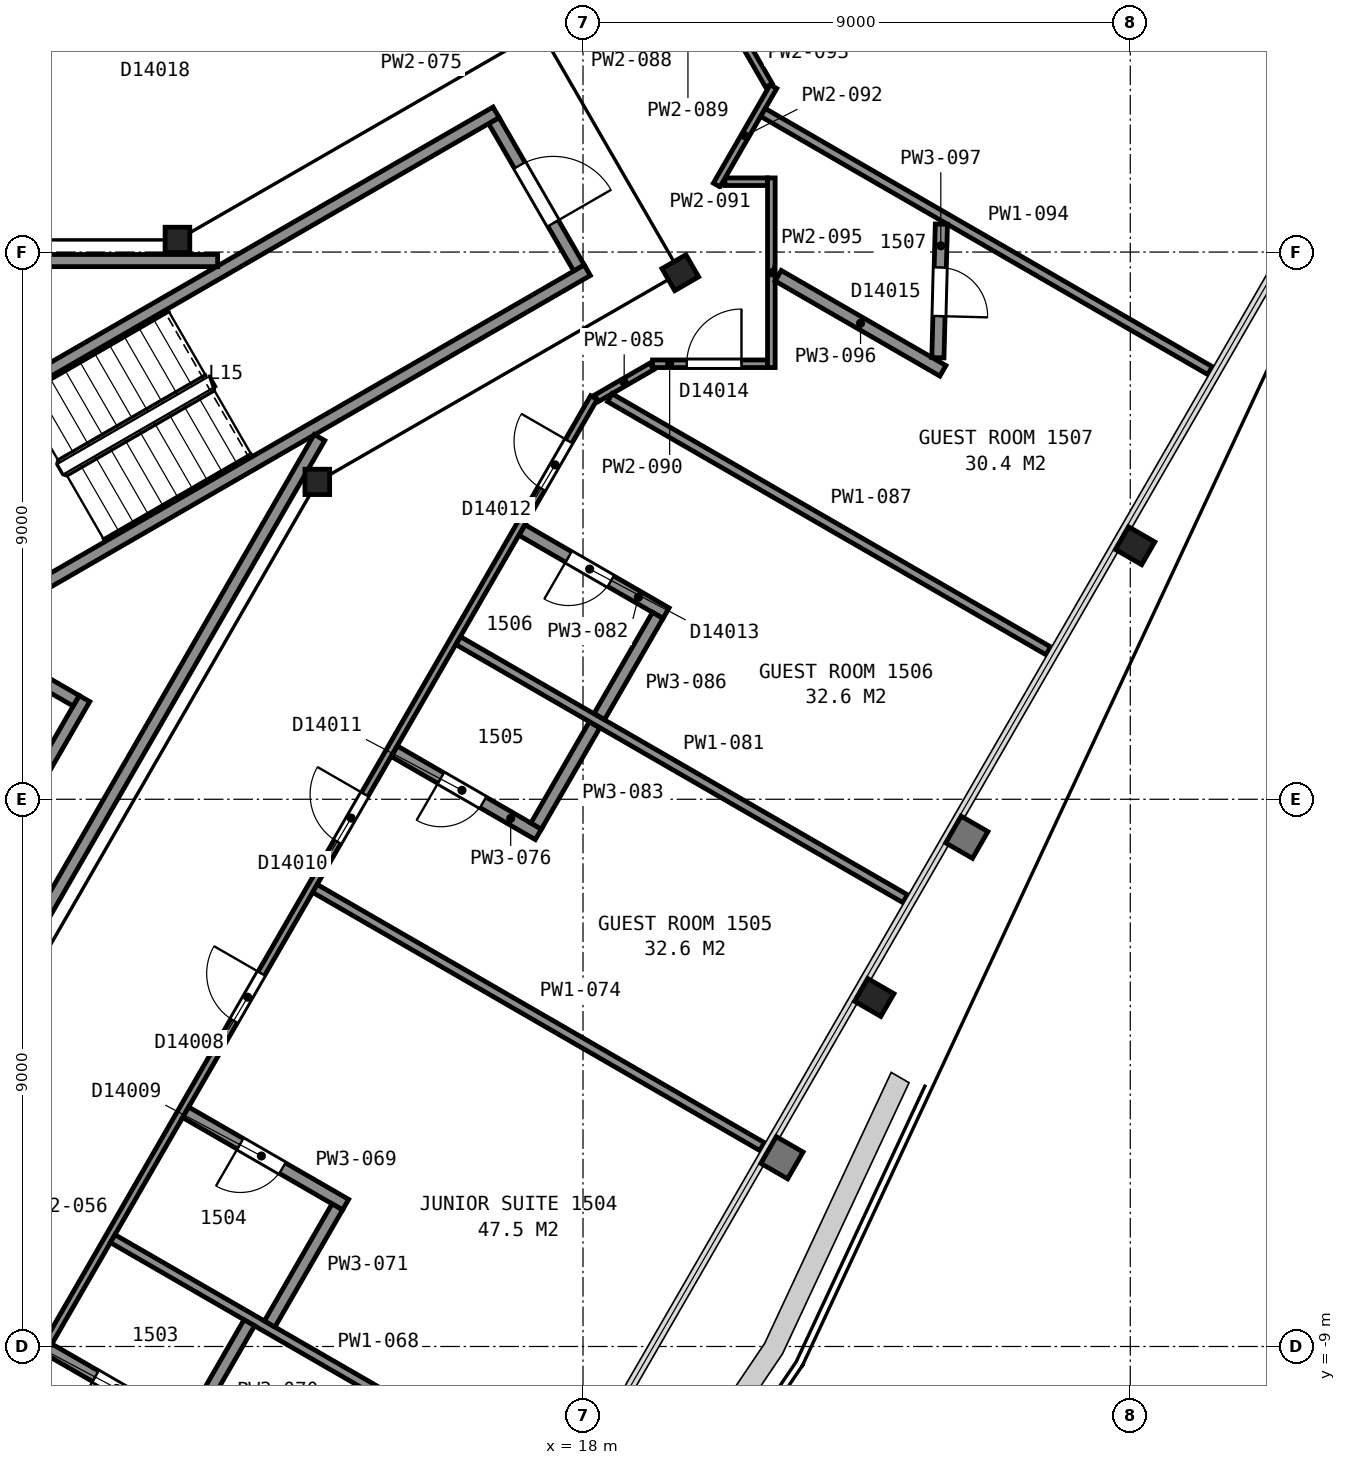
"""IFC4 building model, lengths in metres.
Left out: names, types, materials, properties, quantities, classifications, styles, units other than length and angle.
Written with IfcOpenShell. Run it as: python <this file> out.ifc"""

import sys

from ifc_helpers import new_model, si_unit, direction, frame, frame_2d, origin, origin_2d, place, context, subcontext, project, spatial, rectangle, i_section, extrude, element, fill, save


model = new_model("IFC4")
c1 = context("Model", 3, precision=1e-05, world=origin(), true_north=direction((0.0, 1.0)))
c2 = subcontext(c1, "Body", "Model", "MODEL_VIEW")
j1 = project(units=[si_unit("LENGTHUNIT", "METRE"), si_unit("PLANEANGLEUNIT", "RADIAN")], contexts=[c1])
p1 = place(None, origin())
s1 = spatial("IfcSite", under=j1, at=p1, CompositionType="ELEMENT")
p2 = place(p1, origin())
s2 = spatial("IfcBuilding", under=s1, at=p2, CompositionType="ELEMENT")
p3 = place(p2, frame((0.0, 0.0, 69.2)))
s3 = spatial("IfcBuildingStorey", under=s2, at=p3, CompositionType="ELEMENT", Elevation=69.2)
for number, where, z_axis, x_axis in (
    (1, (22.79, -3.26, 0.0), (0.0, 0.0, 1.0), (-0.5, -0.866, 0.0)),
    (2, (27.08, 4.17, 0.0), (0.0, 0.0, 1.0), (-0.5, -0.866, 0.0)),
):
    element("IfcColumn", number, at=place(p3, frame(where, z_axis=z_axis, x_axis=x_axis)), inside=s3, PredefinedType="COLUMN", context=c2, shape_type="SweptSolid", body=[
        extrude(i_section(OverallWidth=0.432, OverallDepth=0.498, WebThickness=0.056, FlangeThickness=0.089, FilletRadius=0.015, at=origin_2d()), origin(), (0.0, 0.0, 1.0), 3.575),
    ])
p4 = place(p3, frame((13.63, 5.22, 0.0), z_axis=(0.0, 0.0, 1.0), x_axis=(1.0, 0.0, 0.0)))
e3 = element("IfcColumn", 3, at=p4, inside=s3, PredefinedType="COLUMN", context=c2, shape_type="SweptSolid", body=[
    extrude(i_section(OverallWidth=0.406, OverallDepth=0.417, WebThickness=0.03, FlangeThickness=0.048, FilletRadius=0.015, at=origin_2d()), origin(), (0.0, 0.0, 1.0), 3.6),
])
p5 = place(p3, frame((19.6, 8.66, 0.0), z_axis=(0.0, 0.0, 1.0), x_axis=(0.5, -0.866025403784, 0.0)))
e4 = element("IfcColumn", 4, at=p5, inside=s3, PredefinedType="COLUMN", context=c2, shape_type="SweptSolid", body=[
    extrude(i_section(OverallWidth=0.419, OverallDepth=0.455, WebThickness=0.042, FlangeThickness=0.068, FilletRadius=0.015, at=origin_2d()), origin(), (0.0, 0.0, 1.0), 3.6),
])
p6 = place(p3, frame((11.33, 9.2, 0.0), z_axis=(0.0, 0.0, 1.0), x_axis=(1.0, 0.0, 0.0)))
e5 = element("IfcColumn", 5, at=p6, inside=s3, PredefinedType="COLUMN", context=c2, shape_type="SweptSolid", body=[
    extrude(i_section(OverallWidth=0.406, OverallDepth=0.417, WebThickness=0.03, FlangeThickness=0.048, FilletRadius=0.015, at=origin_2d()), origin(), (0.0, 0.0, 1.0), 3.6),
])
p7 = place(p3, frame((17.934, 8.738, 0.0), z_axis=(0.0, 0.0, 1.0), x_axis=(-0.49998411664, 0.866034573852, 0.0)))
e6 = element("IfcWall", 6, at=p7, inside=s3, PredefinedType="PARTITIONING", context=c2, shape_type="SweptSolid", body=[
    extrude(rectangle(XDim=2.8, YDim=0.2, at=frame_2d((1.4, 0.0))), origin(), (0.0, 0.0, 1.0), 3.35),
])
p8 = place(p7, frame((0.85, 0.0, 0.0)))
e7 = element("IfcOpeningElement", 7, at=p8, cuts=e6, PredefinedType="OPENING", context=c2, shape_type="SweptSolid", body=[
    extrude(rectangle(XDim=1.1, YDim=2.1, at=frame_2d((0.55, 1.05))), frame((0.0, 0.11, 0.0), z_axis=(0.0, -1.0, 0.0), x_axis=(1.0, 0.0, 0.0)), (0.0, 0.0, 1.0), 0.22),
])
for number, where, z_axis, x_axis in (
    (8, (6.178, 5.299, 0.0), (0.0, 0.0, 1.0), (0.866, 0.5, 0.0)),
    (9, (7.678, 2.701, 0.0), (0.0, 0.0, 1.0), (0.866, 0.5, 0.0)),
):
    element("IfcWall", number, at=place(p3, frame(where, z_axis=z_axis, x_axis=x_axis)), inside=s3, PredefinedType="PARTITIONING", context=c2, shape_type="SweptSolid", body=[
        extrude(rectangle(XDim=12.0, YDim=0.2, at=frame_2d((6.0, 0.0))), origin(), (0.0, 0.0, 1.0), 3.35),
    ])
p9 = place(p3, frame((7.451, -2.414, 0.0), z_axis=(0.0, 0.0, 1.0), x_axis=(0.500016218704, 0.866016039709, 0.0)))
e10 = element("IfcWall", 10, at=p9, inside=s3, PredefinedType="PARTITIONING", context=c2, shape_type="SweptSolid", body=[
    extrude(rectangle(XDim=4.7, YDim=0.2, at=frame_2d((2.35, 0.0))), origin(), (0.0, 0.0, 1.0), 3.6),
])
p10 = place(p3, frame((9.665, 1.62, 0.0), z_axis=(0.0, 0.0, 1.0), x_axis=(-0.866002029911, 0.500040482552, 0.0)))
e11 = element("IfcWall", 11, at=p10, inside=s3, PredefinedType="PARTITIONING", context=c2, shape_type="SweptSolid", body=[
    extrude(rectangle(XDim=1.75, YDim=0.2, at=frame_2d((0.875, 0.0))), origin(), (0.0, 0.0, 1.0), 3.6),
])
p11 = place(p3, frame((6.177, 8.86, 0.0), z_axis=(0.0, 0.0, 1.0), x_axis=(1.0, 0.0, 0.0)))
e12 = element("IfcWall", 12, at=p11, inside=s3, PredefinedType="PARTITIONING", context=c2, shape_type="SweptSolid", body=[
    extrude(rectangle(XDim=5.814, YDim=0.2, at=frame_2d((2.907, 0.0))), origin(), (0.0, 0.0, 1.0), 3.35),
])
p12 = place(p3, frame((8.492, -3.012, 0.0), z_axis=(0.0, 0.0, 1.0), x_axis=(0.499972957231, 0.866041016371, 0.0)))
e13 = element("IfcWall", 13, at=p12, inside=s3, PredefinedType="PARTITIONING", context=c2, shape_type="SweptSolid", body=[
    extrude(rectangle(XDim=10.349, YDim=0.2, at=frame_2d((5.174, 0.0))), origin(), (0.0, 0.0, 1.0), 3.35),
])
p13 = place(p3, frame((18.179, 6.606, 0.0), z_axis=(0.0, 0.0, 1.0), x_axis=(-0.500003973642, -0.866023109589, 0.0)))
e14 = element("IfcWall", 14, at=p13, inside=s3, PredefinedType="PARTITIONING", context=c2, shape_type="SweptSolid", body=[
    extrude(rectangle(XDim=28.826, YDim=0.125, at=frame_2d((14.413, 0.0))), origin(), (0.0, 0.0, 1.0), 2.613),
])
p14 = place(p13, frame((21.501, 0.0, 0.0)))
e15 = element("IfcOpeningElement", 15, at=p14, cuts=e14, PredefinedType="OPENING", context=c2, shape_type="SweptSolid", body=[
    extrude(rectangle(XDim=0.9, YDim=2.1, at=frame_2d((0.45, 1.05))), frame((0.0, 0.073, 0.0), z_axis=(0.0, -1.0, 0.0), x_axis=(1.0, 0.0, 0.0)), (0.0, 0.0, 1.0), 0.145),
])
p15 = place(p13, frame((18.894, 0.0, 0.0)))
e16 = element("IfcOpeningElement", 16, at=p15, cuts=e14, PredefinedType="OPENING", context=c2, shape_type="SweptSolid", body=[
    extrude(rectangle(XDim=0.9, YDim=2.1, at=frame_2d((0.45, 1.05))), frame((0.0, 0.073, 0.0), z_axis=(0.0, -1.0, 0.0), x_axis=(1.0, 0.0, 0.0)), (0.0, 0.0, 1.0), 0.145),
])
p16 = place(p13, frame((10.937, 0.0, 0.0)))
e17 = element("IfcOpeningElement", 17, at=p16, cuts=e14, PredefinedType="OPENING", context=c2, shape_type="SweptSolid", body=[
    extrude(rectangle(XDim=0.9, YDim=2.1, at=frame_2d((0.45, 1.05))), frame((0.0, 0.073, 0.0), z_axis=(0.0, -1.0, 0.0), x_axis=(1.0, 0.0, 0.0)), (0.0, 0.0, 1.0), 0.145),
])
p17 = place(p13, frame((7.535, 0.0, 0.0)))
e18 = element("IfcOpeningElement", 18, at=p17, cuts=e14, PredefinedType="OPENING", context=c2, shape_type="SweptSolid", body=[
    extrude(rectangle(XDim=0.9, YDim=2.1, at=frame_2d((0.45, 1.05))), frame((0.0, 0.073, 0.0), z_axis=(0.0, -1.0, 0.0), x_axis=(1.0, 0.0, 0.0)), (0.0, 0.0, 1.0), 0.145),
])
p18 = place(p13, frame((0.827, 0.0, 0.0)))
e19 = element("IfcOpeningElement", 19, at=p18, cuts=e14, PredefinedType="OPENING", context=c2, shape_type="SweptSolid", body=[
    extrude(rectangle(XDim=0.9, YDim=2.1, at=frame_2d((0.45, 1.05))), frame((0.0, 0.073, 0.0), z_axis=(0.0, -1.0, 0.0), x_axis=(1.0, 0.0, 0.0)), (0.0, 0.0, 1.0), 0.145),
])
p19 = place(p3, frame((9.215, -9.045, 0.0), z_axis=(0.0, 0.0, 1.0), x_axis=(0.865989529477, -0.500062130976, 0.0)))
e20 = element("IfcWall", 20, at=p19, inside=s3, PredefinedType="PARTITIONING", context=c2, shape_type="SweptSolid", body=[
    extrude(rectangle(XDim=2.738, YDim=0.2, at=frame_2d((1.369, 0.0))), origin(), (0.0, 0.0, 1.0), 2.613),
])
p20 = place(p19, frame((0.887, 0.0, 0.0)))
e21 = element("IfcOpeningElement", 21, at=p20, cuts=e20, PredefinedType="OPENING", context=c2, shape_type="SweptSolid", body=[
    extrude(rectangle(XDim=0.8, YDim=2.1, at=frame_2d((0.4, 1.05))), frame((0.0, 0.11, 0.0), z_axis=(0.0, -1.0, 0.0), x_axis=(1.0, 0.0, 0.0)), (0.0, 0.0, 1.0), 0.22),
])
p21 = place(p3, frame((10.265, -7.226, 0.0), z_axis=(0.0, 0.0, 1.0), x_axis=(0.866024716685, -0.500001190089, 0.0)))
e22 = element("IfcWall", 22, at=p21, inside=s3, PredefinedType="PARTITIONING", context=c2, shape_type="SweptSolid", body=[
    extrude(rectangle(XDim=8.492, YDim=0.15, at=frame_2d((4.246, 0.0))), origin(), (0.0, 0.0, 1.0), 2.613),
])
p22 = place(p3, frame((14.096, -6.667, 0.0), z_axis=(0.0, 0.0, 1.0), x_axis=(-0.866023634079, 0.500003065207, 0.0)))
e23 = element("IfcWall", 23, at=p22, inside=s3, PredefinedType="PARTITIONING", context=c2, shape_type="SweptSolid", body=[
    extrude(rectangle(XDim=3.038, YDim=0.2, at=frame_2d((1.519, 0.0))), origin(), (0.0, 0.0, 1.0), 2.613),
])
p23 = place(p22, frame((1.2, 0.0, 0.0)))
e24 = element("IfcOpeningElement", 24, at=p23, cuts=e23, PredefinedType="OPENING", context=c2, shape_type="SweptSolid", body=[
    extrude(rectangle(XDim=0.8, YDim=2.1, at=frame_2d((0.4, 1.05))), frame((0.0, 0.11, 0.0), z_axis=(0.0, -1.0, 0.0), x_axis=(1.0, 0.0, 0.0)), (0.0, 0.0, 1.0), 0.22),
])
p24 = place(p3, frame((11.549, -10.277, 0.0), z_axis=(0.0, 0.0, 1.0), x_axis=(0.499876134923, 0.86609690551, 0.0)))
e25 = element("IfcWall", 25, at=p24, inside=s3, PredefinedType="PARTITIONING", context=c2, shape_type="SweptSolid", body=[
    extrude(rectangle(XDim=1.925, YDim=0.2, at=frame_2d((0.963, 0.0))), origin(), (0.0, 0.0, 1.0), 2.613),
])
p25 = place(p3, frame((12.846, -8.63, 0.0), z_axis=(0.0, 0.0, 1.0), x_axis=(0.500092923031, 0.865971748, 0.0)))
e26 = element("IfcWall", 26, at=p25, inside=s3, PredefinedType="PARTITIONING", context=c2, shape_type="SweptSolid", body=[
    extrude(rectangle(XDim=2.225, YDim=0.2, at=frame_2d((1.112, 0.0))), origin(), (0.0, 0.0, 1.0), 2.613),
])
p26 = place(p3, frame((13.591, -1.466, 0.0), z_axis=(0.0, 0.0, 1.0), x_axis=(0.866022790583, -0.50000452617, 0.0)))
e27 = element("IfcWall", 27, at=p26, inside=s3, PredefinedType="PARTITIONING", context=c2, shape_type="SweptSolid", body=[
    extrude(rectangle(XDim=8.491, YDim=0.15, at=frame_2d((4.246, 0.0))), origin(), (0.0, 0.0, 1.0), 2.613),
])
p27 = place(p3, frame((14.898, 0.789, 0.0), z_axis=(0.0, 0.0, 1.0), x_axis=(0.866102295869, -0.499866795347, 0.0)))
e28 = element("IfcWall", 28, at=p27, inside=s3, PredefinedType="PARTITIONING", context=c2, shape_type="SweptSolid", body=[
    extrude(rectangle(XDim=2.733, YDim=0.2, at=frame_2d((1.367, 0.0))), origin(), (0.0, 0.0, 1.0), 2.613),
])
p28 = place(p27, frame((0.883, 0.0, 0.0)))
e29 = element("IfcOpeningElement", 29, at=p28, cuts=e28, PredefinedType="OPENING", context=c2, shape_type="SweptSolid", body=[
    extrude(rectangle(XDim=0.8, YDim=2.1, at=frame_2d((0.4, 1.05))), frame((0.0, 0.11, 0.0), z_axis=(0.0, -1.0, 0.0), x_axis=(1.0, 0.0, 0.0)), (0.0, 0.0, 1.0), 0.22),
])
p29 = place(p3, frame((15.948, 2.608, 0.0), z_axis=(0.0, 0.0, 1.0), x_axis=(0.866059124033, -0.499941590267, 0.0)))
e30 = element("IfcWall", 30, at=p29, inside=s3, PredefinedType="PARTITIONING", context=c2, shape_type="SweptSolid", body=[
    extrude(rectangle(XDim=8.487, YDim=0.15, at=frame_2d((4.243, 0.0))), origin(), (0.0, 0.0, 1.0), 2.613),
])
p30 = place(p3, frame((19.366, 3.061, 0.0), z_axis=(0.0, 0.0, 1.0), x_axis=(-0.866102295869, 0.499866795347, 0.0)))
e31 = element("IfcWall", 31, at=p30, inside=s3, PredefinedType="PARTITIONING", context=c2, shape_type="SweptSolid", body=[
    extrude(rectangle(XDim=2.733, YDim=0.2, at=frame_2d((1.367, 0.0))), origin(), (0.0, 0.0, 1.0), 2.613),
])
p31 = place(p30, frame((1.051, 0.0, 0.0)))
e32 = element("IfcOpeningElement", 32, at=p31, cuts=e31, PredefinedType="OPENING", context=c2, shape_type="SweptSolid", body=[
    extrude(rectangle(XDim=0.8, YDim=2.1, at=frame_2d((0.4, 1.05))), frame((0.0, 0.11, 0.0), z_axis=(0.0, -1.0, 0.0), x_axis=(1.0, 0.0, 0.0)), (0.0, 0.0, 1.0), 0.22),
])
p32 = place(p3, frame((17.229, -0.44, 0.0), z_axis=(0.0, 0.0, 1.0), x_axis=(0.499667418833, 0.866217334482, 0.0)))
e33 = element("IfcWall", 33, at=p32, inside=s3, PredefinedType="PARTITIONING", context=c2, shape_type="SweptSolid", body=[
    extrude(rectangle(XDim=1.92, YDim=0.2, at=frame_2d((0.96, 0.0))), origin(), (0.0, 0.0, 1.0), 2.613),
])
p33 = place(p3, frame((18.222, 6.594, 0.0), z_axis=(0.0, 0.0, 1.0), x_axis=(0.865876245925, 0.500258260045, 0.0)))
e34 = element("IfcWall", 34, at=p33, inside=s3, PredefinedType="PARTITIONING", context=c2, shape_type="SweptSolid", body=[
    extrude(rectangle(XDim=1.052, YDim=0.125, at=frame_2d((0.526, 0.0))), origin(), (0.0, 0.0, 1.0), 2.613),
])
p34 = place(p3, frame((18.269, 1.361, 0.0), z_axis=(0.0, 0.0, 1.0), x_axis=(0.499993829411, 0.866028966346, 0.0)))
e35 = element("IfcWall", 35, at=p34, inside=s3, PredefinedType="PARTITIONING", context=c2, shape_type="SweptSolid", body=[
    extrude(rectangle(XDim=1.921, YDim=0.2, at=frame_2d((0.96, 0.0))), origin(), (0.0, 0.0, 1.0), 2.613),
])
p35 = place(p3, frame((18.44, 6.605, 0.0), z_axis=(0.0, 0.0, 1.0), x_axis=(0.866044499518, -0.49996692376, 0.0)))
e36 = element("IfcWall", 36, at=p35, inside=s3, PredefinedType="PARTITIONING", context=c2, shape_type="SweptSolid", body=[
    extrude(rectangle(XDim=8.328, YDim=0.15, at=frame_2d((4.164, 0.0))), origin(), (0.0, 0.0, 1.0), 2.613),
])
p36 = place(p3, frame((21.032, 7.163, 0.0), z_axis=(0.0, 0.0, 1.0), x_axis=(-1.0, 0.0, 0.0)))
e37 = element("IfcWall", 37, at=p36, inside=s3, PredefinedType="PARTITIONING", context=c2, shape_type="SweptSolid", body=[
    extrude(rectangle(XDim=1.888, YDim=0.125, at=frame_2d((0.944, 0.0))), origin(), (0.0, 0.0, 1.0), 2.613),
])
p37 = place(p36, frame((0.426, 0.0, 0.0)))
e38 = element("IfcOpeningElement", 38, at=p37, cuts=e37, PredefinedType="OPENING", context=c2, shape_type="SweptSolid", body=[
    extrude(rectangle(XDim=0.9, YDim=2.1, at=frame_2d((0.45, 1.05))), frame((0.0, 0.073, 0.0), z_axis=(0.0, -1.0, 0.0), x_axis=(1.0, 0.0, 0.0)), (0.0, 0.0, 1.0), 0.145),
])
p38 = place(p3, frame((20.334, 10.157, 0.0), z_axis=(0.0, 0.0, 1.0), x_axis=(1.0, 0.0, 0.0)))
e39 = element("IfcWall", 39, at=p38, inside=s3, PredefinedType="PARTITIONING", context=c2, shape_type="SweptSolid", body=[
    extrude(rectangle(XDim=0.698, YDim=0.125, at=frame_2d((0.349, 0.0))), origin(), (0.0, 0.0, 1.0), 2.613),
])
p39 = place(p3, frame((20.198, 10.103, 0.0), z_axis=(0.0, 0.0, 1.0), x_axis=(0.500072997275, 0.865983254686, 0.0)))
e40 = element("IfcWall", 40, at=p39, inside=s3, PredefinedType="PARTITIONING", context=c2, shape_type="SweptSolid", body=[
    extrude(rectangle(XDim=1.869, YDim=0.125, at=frame_2d((0.935, 0.0))), origin(), (0.0, 0.0, 1.0), 2.613),
])
p40 = place(p3, frame((20.697, 12.367, 0.0), z_axis=(0.0, 0.0, 1.0), x_axis=(0.500238258503, -0.865887801468, 0.0)))
e41 = element("IfcWall", 41, at=p40, inside=s3, PredefinedType="PARTITIONING", context=c2, shape_type="SweptSolid", body=[
    extrude(rectangle(XDim=0.724, YDim=0.125, at=frame_2d((0.362, 0.0))), origin(), (0.0, 0.0, 1.0), 2.613),
])
p41 = place(p3, frame((20.959, 11.296, 0.0), z_axis=(0.0, 0.0, 1.0), x_axis=(0.866022790583, -0.50000452617, 0.0)))
e42 = element("IfcWall", 42, at=p41, inside=s3, PredefinedType="PARTITIONING", context=c2, shape_type="SweptSolid", body=[
    extrude(rectangle(XDim=8.491, YDim=0.15, at=frame_2d((4.246, 0.0))), origin(), (0.0, 0.0, 1.0), 2.613),
])
p42 = place(p3, frame((21.097, 7.101, 0.0), z_axis=(0.0, 0.0, 1.0), x_axis=(0.0, 1.0, 0.0)))
e43 = element("IfcWall", 43, at=p42, inside=s3, PredefinedType="PARTITIONING", context=c2, shape_type="SweptSolid", body=[
    extrude(rectangle(XDim=3.119, YDim=0.125, at=frame_2d((1.56, 0.0))), origin(), (0.0, 0.0, 1.0), 2.613),
])
p43 = place(p3, frame((21.209, 8.611, 0.0), z_axis=(0.0, 0.0, 1.0), x_axis=(0.866054327916, -0.499949898588, 0.0)))
e44 = element("IfcWall", 44, at=p43, inside=s3, PredefinedType="PARTITIONING", context=c2, shape_type="SweptSolid", body=[
    extrude(rectangle(XDim=3.128, YDim=0.2, at=frame_2d((1.564, 0.0))), origin(), (0.0, 0.0, 1.0), 2.613),
])
p44 = place(p3, frame((23.836, 7.262, 0.0), z_axis=(0.0, 0.0, 1.0), x_axis=(0.025988330811, 0.999662246292, 0.0)))
e45 = element("IfcWall", 45, at=p44, inside=s3, PredefinedType="PARTITIONING", context=c2, shape_type="SweptSolid", body=[
    extrude(rectangle(XDim=2.198, YDim=0.2, at=frame_2d((1.099, 0.0))), origin(), (0.0, 0.0, 1.0), 2.613),
])
p45 = place(p44, frame((0.685, 0.0, 0.0)))
e46 = element("IfcOpeningElement", 46, at=p45, cuts=e45, PredefinedType="OPENING", context=c2, shape_type="SweptSolid", body=[
    extrude(rectangle(XDim=0.8, YDim=2.1, at=frame_2d((0.4, 1.05))), frame((0.0, 0.11, 0.0), z_axis=(0.0, -1.0, 0.0), x_axis=(1.0, 0.0, 0.0)), (0.0, 0.0, 1.0), 0.22),
])
p46 = place(p8, origin())
e47 = element("IfcDoor", 47, at=p46, inside=s3, OperationType="SINGLE_SWING_LEFT", PredefinedType="DOOR", context=c2, shape_type="SweptSolid", body=[
    extrude(rectangle(XDim=1.1, YDim=2.1, at=frame_2d((0.55, 1.05))), frame((0.0, 0.025, 0.0), z_axis=(0.0, -1.0, 0.0), x_axis=(1.0, 0.0, 0.0)), (0.0, 0.0, 1.0), 0.05),
])
fill(e7, e47)
p47 = place(p16, origin())
e48 = element("IfcDoor", 48, at=p47, inside=s3, OperationType="SINGLE_SWING_LEFT", PredefinedType="DOOR", context=c2, shape_type="SweptSolid", body=[
    extrude(rectangle(XDim=0.9, YDim=2.1, at=frame_2d((0.45, 1.05))), frame((0.0, 0.025, 0.0), z_axis=(0.0, -1.0, 0.0), x_axis=(1.0, 0.0, 0.0)), (0.0, 0.0, 1.0), 0.05),
])
fill(e17, e48)
p48 = place(p17, origin())
e49 = element("IfcDoor", 49, at=p48, inside=s3, OperationType="SINGLE_SWING_LEFT", PredefinedType="DOOR", context=c2, shape_type="SweptSolid", body=[
    extrude(rectangle(XDim=0.9, YDim=2.1, at=frame_2d((0.45, 1.05))), frame((0.0, 0.025, 0.0), z_axis=(0.0, -1.0, 0.0), x_axis=(1.0, 0.0, 0.0)), (0.0, 0.0, 1.0), 0.05),
])
fill(e18, e49)
p49 = place(p18, origin())
e50 = element("IfcDoor", 50, at=p49, inside=s3, OperationType="SINGLE_SWING_LEFT", PredefinedType="DOOR", context=c2, shape_type="SweptSolid", body=[
    extrude(rectangle(XDim=0.9, YDim=2.1, at=frame_2d((0.45, 1.05))), frame((0.0, 0.025, 0.0), z_axis=(0.0, -1.0, 0.0), x_axis=(1.0, 0.0, 0.0)), (0.0, 0.0, 1.0), 0.05),
])
fill(e19, e50)
p50 = place(p20, origin())
e51 = element("IfcDoor", 51, at=p50, inside=s3, OperationType="SINGLE_SWING_LEFT", PredefinedType="DOOR", context=c2, shape_type="SweptSolid", body=[
    extrude(rectangle(XDim=0.8, YDim=2.1, at=frame_2d((0.4, 1.05))), frame((0.0, 0.025, 0.0), z_axis=(0.0, -1.0, 0.0), x_axis=(1.0, 0.0, 0.0)), (0.0, 0.0, 1.0), 0.05),
])
fill(e21, e51)
p51 = place(p23, origin())
e52 = element("IfcDoor", 52, at=p51, inside=s3, OperationType="SINGLE_SWING_RIGHT", PredefinedType="DOOR", context=c2, shape_type="SweptSolid", body=[
    extrude(rectangle(XDim=0.8, YDim=2.1, at=frame_2d((0.4, 1.05))), frame((0.0, 0.025, 0.0), z_axis=(0.0, -1.0, 0.0), x_axis=(1.0, 0.0, 0.0)), (0.0, 0.0, 1.0), 0.05),
])
fill(e24, e52)
p52 = place(p28, origin())
e53 = element("IfcDoor", 53, at=p52, inside=s3, OperationType="SINGLE_SWING_LEFT", PredefinedType="DOOR", context=c2, shape_type="SweptSolid", body=[
    extrude(rectangle(XDim=0.8, YDim=2.1, at=frame_2d((0.4, 1.05))), frame((0.0, 0.025, 0.0), z_axis=(0.0, -1.0, 0.0), x_axis=(1.0, 0.0, 0.0)), (0.0, 0.0, 1.0), 0.05),
])
fill(e29, e53)
p53 = place(p31, origin())
e54 = element("IfcDoor", 54, at=p53, inside=s3, OperationType="SINGLE_SWING_RIGHT", PredefinedType="DOOR", context=c2, shape_type="SweptSolid", body=[
    extrude(rectangle(XDim=0.8, YDim=2.1, at=frame_2d((0.4, 1.05))), frame((0.0, 0.025, 0.0), z_axis=(0.0, -1.0, 0.0), x_axis=(1.0, 0.0, 0.0)), (0.0, 0.0, 1.0), 0.05),
])
fill(e32, e54)
p54 = place(p37, origin())
e55 = element("IfcDoor", 55, at=p54, inside=s3, OperationType="SINGLE_SWING_LEFT", PredefinedType="DOOR", context=c2, shape_type="SweptSolid", body=[
    extrude(rectangle(XDim=0.9, YDim=2.1, at=frame_2d((0.45, 1.05))), frame((0.0, 0.025, 0.0), z_axis=(0.0, -1.0, 0.0), x_axis=(1.0, 0.0, 0.0)), (0.0, 0.0, 1.0), 0.05),
])
fill(e38, e55)
p55 = place(p45, origin())
e56 = element("IfcDoor", 56, at=p55, inside=s3, OperationType="SINGLE_SWING_LEFT", PredefinedType="DOOR", context=c2, shape_type="SweptSolid", body=[
    extrude(rectangle(XDim=0.8, YDim=2.1, at=frame_2d((0.4, 1.05))), frame((0.0, 0.025, 0.0), z_axis=(0.0, -1.0, 0.0), x_axis=(1.0, 0.0, 0.0)), (0.0, 0.0, 1.0), 0.05),
])
fill(e46, e56)
save(model, sys.argv[1])
